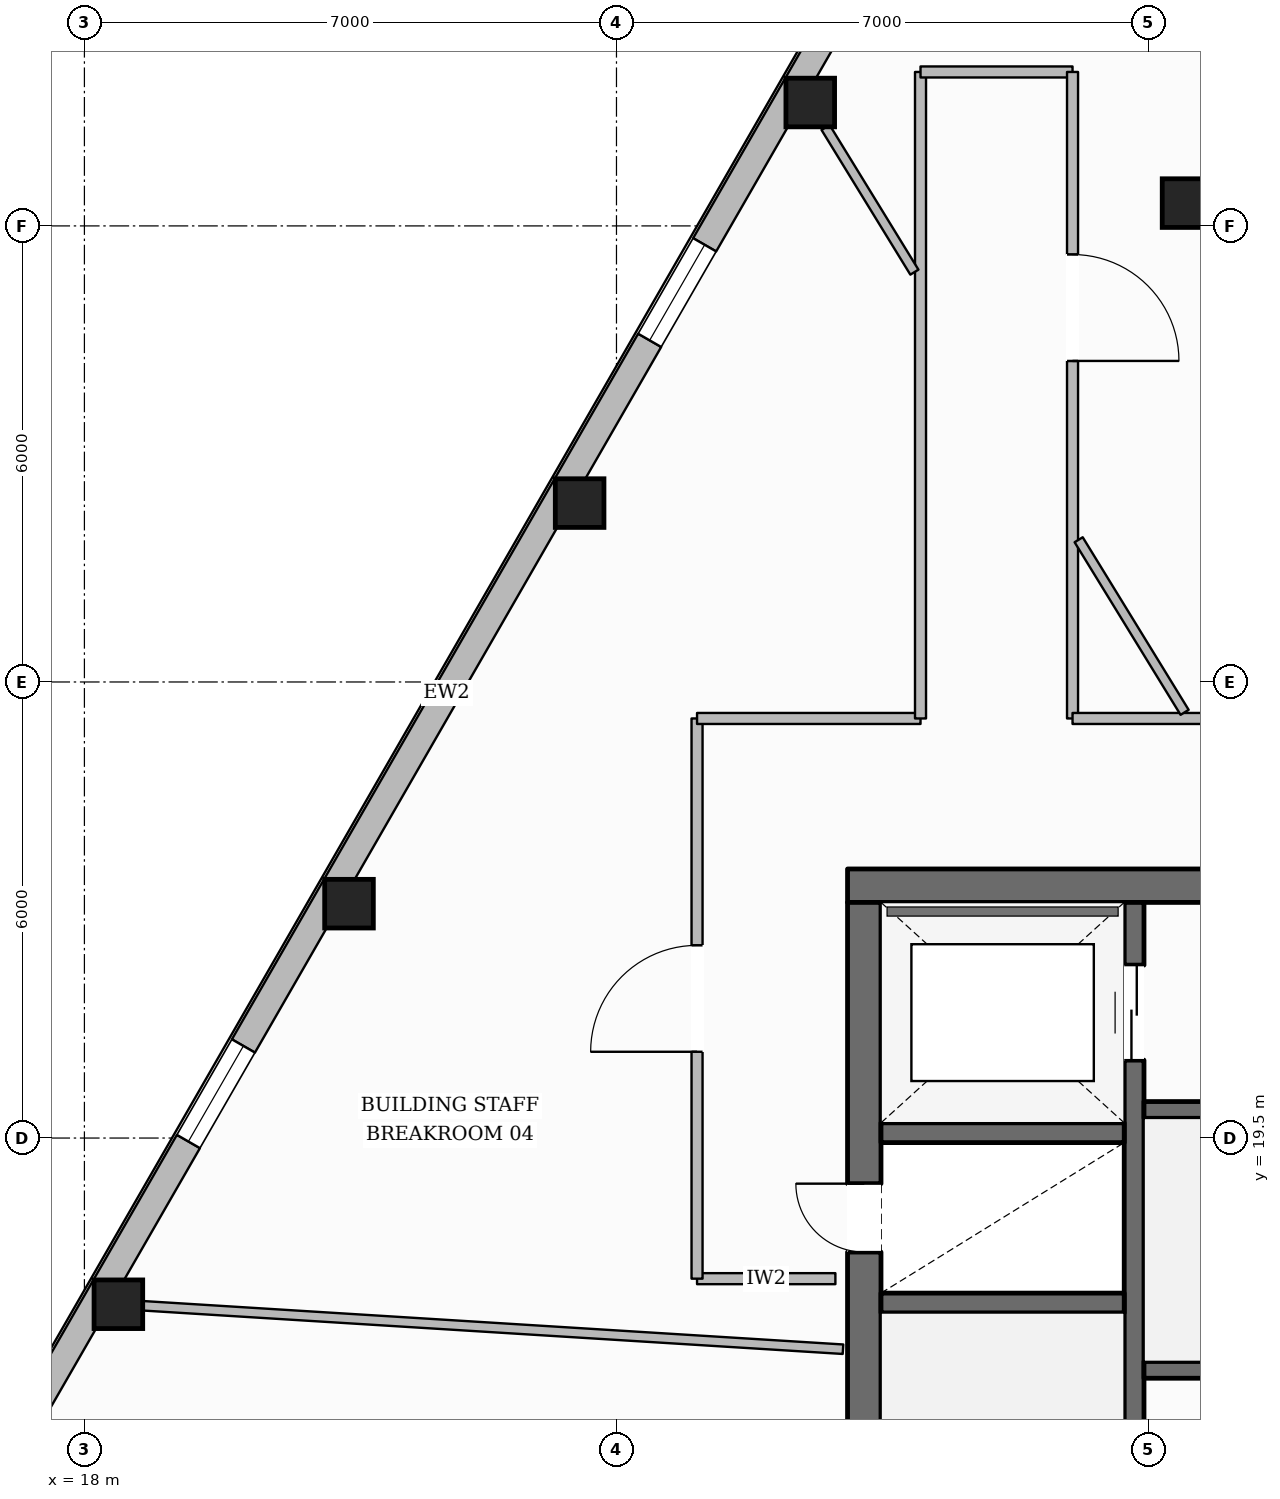
"""IFC4 building model, lengths in metres.
Left out: names, types, materials, properties, quantities, classifications, styles, units other than length and angle.
Written with IfcOpenShell. Run it as: python <this file> out.ifc"""

import sys

from ifc_helpers import new_model, si_unit, direction, frame, frame_2d, origin, origin_2d, place, context, subcontext, project, spatial, rectangle, hollow_rectangle, extrude, element, fill, save


model = new_model("IFC4")
c1 = context("Model", 3, precision=1e-05, world=origin(), true_north=direction((0.0, 1.0)))
c2 = subcontext(c1, "Body", "Model", "MODEL_VIEW")
j1 = project(units=[si_unit("LENGTHUNIT", "METRE"), si_unit("PLANEANGLEUNIT", "RADIAN")], contexts=[c1])
p1 = place(None, origin())
s1 = spatial("IfcSite", under=j1, at=p1, CompositionType="ELEMENT")
p2 = place(p1, origin())
s2 = spatial("IfcBuilding", under=s1, at=p2, CompositionType="ELEMENT")
p3 = place(p2, frame((0.0, 0.0, 191.95)))
s3 = spatial("IfcBuildingStorey", under=s2, at=p3, CompositionType="ELEMENT", Elevation=191.95)
p4 = place(p3, frame((28.04, 22.82, 0.0), z_axis=(0.0, 0.0, 1.0), x_axis=(1.0, 0.0, 0.0)))
e1 = element("IfcWall", 1, at=p4, inside=s3, PredefinedType="SOLIDWALL", context=c2, shape_type="SweptSolid", body=[
    extrude(rectangle(XDim=19.92, YDim=0.44, at=frame_2d((9.96, 0.0))), origin(), (0.0, 0.0, 1.0), 3.6),
])
p5 = place(p4, frame((6.235, 0.0, 0.0)))
e2 = element("IfcOpeningElement", 2, at=p5, cuts=e1, PredefinedType="OPENING", context=c2, shape_type="SweptSolid", body=[
    extrude(rectangle(XDim=1.05, YDim=2.15, at=frame_2d((0.525, 1.075))), frame((0.0, 0.23, 0.0), z_axis=(0.0, -1.0, 0.0), x_axis=(1.0, 0.0, 0.0)), (0.0, 0.0, 1.0), 0.46),
])
p6 = place(p4, frame((12.635, 0.0, 0.0)))
e3 = element("IfcOpeningElement", 3, at=p6, cuts=e1, PredefinedType="OPENING", context=c2, shape_type="SweptSolid", body=[
    extrude(rectangle(XDim=1.05, YDim=2.15, at=frame_2d((0.525, 1.075))), frame((0.0, 0.23, 0.0), z_axis=(0.0, -1.0, 0.0), x_axis=(1.0, 0.0, 0.0)), (0.0, 0.0, 1.0), 0.46),
])
p7 = place(p3, frame((28.26, 9.6, 0.0), z_axis=(0.0, 0.0, 1.0), x_axis=(0.0, 1.0, 0.0)))
e4 = element("IfcWall", 4, at=p7, inside=s3, PredefinedType="SOLIDWALL", context=c2, shape_type="SweptSolid", body=[
    extrude(rectangle(XDim=13.0, YDim=0.44, at=frame_2d((6.5, 0.0))), origin(), (0.0, 0.0, 1.0), 3.6),
])
p8 = place(p7, frame((0.2, 0.0, 0.0)))
e5 = element("IfcOpeningElement", 5, at=p8, cuts=e4, PredefinedType="OPENING", context=c2, shape_type="SweptSolid", body=[
    extrude(rectangle(XDim=1.1, YDim=2.15, at=frame_2d((0.55, 1.075))), frame((0.0, 0.23, 0.0), z_axis=(0.0, -1.0, 0.0), x_axis=(1.0, 0.0, 0.0)), (0.0, 0.0, 1.0), 0.46),
])
p9 = place(p7, frame((8.4, 0.0, 0.0)))
e6 = element("IfcOpeningElement", 6, at=p9, cuts=e4, PredefinedType="OPENING", context=c2, shape_type="SweptSolid", body=[
    extrude(rectangle(XDim=0.9, YDim=2.1, at=frame_2d((0.45, 1.05))), frame((0.0, 0.23, 0.0), z_axis=(0.0, -1.0, 0.0), x_axis=(1.0, 0.0, 0.0)), (0.0, 0.0, 1.0), 0.46),
])
p10 = place(p3, frame((31.81, 9.6, 0.0), z_axis=(0.0, 0.0, 1.0), x_axis=(0.0, 1.0, 0.0)))
e7 = element("IfcWall", 7, at=p10, inside=s3, PredefinedType="SHEAR", context=c2, shape_type="SweptSolid", body=[
    extrude(rectangle(XDim=13.0, YDim=0.26, at=frame_2d((6.5, 0.0))), origin(), (0.0, 0.0, 1.0), 3.6),
])
p11 = place(p10, frame((10.925, 0.0, 0.0)))
e8 = element("IfcOpeningElement", 8, at=p11, cuts=e7, PredefinedType="OPENING", context=c2, shape_type="SweptSolid", body=[
    extrude(rectangle(XDim=1.25, YDim=2.25, at=frame_2d((0.625, 1.125))), frame((0.0, 0.14, 0.0), z_axis=(0.0, -1.0, 0.0), x_axis=(1.0, 0.0, 0.0)), (0.0, 0.0, 1.0), 0.28),
])
for number, where, z_axis, x_axis in (
    (9, (28.48, 17.33, 0.0), (0.0, 0.0, 1.0), (1.0, 0.0, 0.0)),
    (10, (28.48, 19.57, 0.0), (0.0, 0.0, 1.0), (1.0, 0.0, 0.0)),
):
    element("IfcWall", number, at=place(p3, frame(where, z_axis=z_axis, x_axis=x_axis)), inside=s3, PredefinedType="SHEAR", context=c2, shape_type="SweptSolid", body=[
        extrude(rectangle(XDim=3.2, YDim=0.26, at=frame_2d((1.6, 0.0))), origin(), (0.0, 0.0, 1.0), 3.6),
    ])
p12 = place(p3, frame((31.94, 19.87, 0.0), z_axis=(0.0, 0.0, 1.0), x_axis=(1.0, 0.0, 0.0)))
e11 = element("IfcWall", 11, at=p12, inside=s3, PredefinedType="SOLIDWALL", context=c2, shape_type="SweptSolid", body=[
    extrude(rectangle(XDim=12.12, YDim=0.22, at=frame_2d((6.06, 0.0))), origin(), (0.0, 0.0, 1.0), 3.6),
])
p13 = place(p12, frame((6.3, 0.0, 0.0)))
e12 = element("IfcOpeningElement", 12, at=p13, cuts=e11, PredefinedType="OPENING", context=c2, shape_type="SweptSolid", body=[
    extrude(rectangle(XDim=1.1, YDim=2.15, at=frame_2d((0.55, 1.075))), frame((0.0, 0.12, 0.0), z_axis=(0.0, -1.0, 0.0), x_axis=(1.0, 0.0, 0.0)), (0.0, 0.0, 1.0), 0.24),
])
p14 = place(p12, frame((9.51, 0.0, 0.0)))
e13 = element("IfcOpeningElement", 13, at=p14, cuts=e11, PredefinedType="OPENING", context=c2, shape_type="SweptSolid", body=[
    extrude(rectangle(XDim=0.9, YDim=2.1, at=frame_2d((0.45, 1.05))), frame((0.0, 0.12, 0.0), z_axis=(0.0, -1.0, 0.0), x_axis=(1.0, 0.0, 0.0)), (0.0, 0.0, 1.0), 0.24),
])
p15 = place(p3, frame((31.94, 16.45, 0.0), z_axis=(0.0, 0.0, 1.0), x_axis=(1.0, 0.0, 0.0)))
e14 = element("IfcWall", 14, at=p15, inside=s3, PredefinedType="SOLIDWALL", context=c2, shape_type="SweptSolid", body=[
    extrude(rectangle(XDim=12.12, YDim=0.22, at=frame_2d((6.06, 0.0))), origin(), (0.0, 0.0, 1.0), 3.6),
])
for number, where, z_axis, x_axis in (
    (15, (27.549, 33.123, 0.0), (0.0, 0.0, 1.0), (1.0, 0.0, 0.0)),
    (16, (24.515, 27.854, 0.0), (0.0, 0.0, 1.0), (1.0, 0.0, 0.0)),
    (17, (21.481, 22.583, 0.0), (0.0, 0.0, 1.0), (1.0, 0.0, 0.0)),
    (18, (18.447, 17.313, 0.0), (0.0, 0.0, 1.0), (1.0, 0.0, 0.0)),
    (19, (32.5, 31.8, 0.0), (0.0, 0.0, 1.0), (1.0, 0.0, 0.0)),
):
    element("IfcColumn", number, at=place(p3, frame(where, z_axis=z_axis, x_axis=x_axis)), inside=s3, PredefinedType="COLUMN", context=c2, shape_type="SweptSolid", body=[
        extrude(hollow_rectangle(XDim=0.64, YDim=0.64, WallThickness=0.028, at=origin_2d()), origin(), (0.0, 0.0, 1.0), 3.6),
    ])
p16 = place(p3, frame((14.94, 11.763, 0.0), z_axis=(0.0, 0.0, 1.0), x_axis=(0.498943522518, 0.866634502739, 0.0)))
e20 = element("IfcWall", 20, at=p16, inside=s3, PredefinedType="STANDARD", context=c2, shape_type="SweptSolid", body=[
    extrude(rectangle(XDim=37.445, YDim=0.35, at=frame_2d((18.723, 0.0))), origin(), (0.0, 0.0, 1.0), 3.132),
])
p17 = place(p16, frame((27.484, 0.0, 0.0)))
e21 = element("IfcOpeningElement", 21, at=p17, cuts=e20, PredefinedType="OPENING", context=c2, shape_type="SweptSolid", body=[
    extrude(rectangle(XDim=1.0, YDim=2.2, at=frame_2d((0.5, 1.1))), frame((0.0, 0.185, 0.0), z_axis=(0.0, -1.0, 0.0), x_axis=(1.0, 0.0, 0.0)), (0.0, 0.0, 1.0), 0.37),
])
p18 = place(p16, frame((33.2, 0.0, 0.65)))
e22 = element("IfcOpeningElement", 22, at=p18, cuts=e20, PredefinedType="OPENING", context=c2, shape_type="SweptSolid", body=[
    extrude(rectangle(XDim=1.45, YDim=1.75, at=frame_2d((0.725, 0.875))), frame((0.0, 0.185, 0.0), z_axis=(0.0, -1.0, 0.0), x_axis=(1.0, 0.0, 0.0)), (0.0, 0.0, 1.0), 0.37),
])
p19 = place(p16, frame((21.038, 0.0, 0.65)))
e23 = element("IfcOpeningElement", 23, at=p19, cuts=e20, PredefinedType="OPENING", context=c2, shape_type="SweptSolid", body=[
    extrude(rectangle(XDim=1.45, YDim=1.75, at=frame_2d((0.725, 0.875))), frame((0.0, 0.185, 0.0), z_axis=(0.0, -1.0, 0.0), x_axis=(1.0, 0.0, 0.0)), (0.0, 0.0, 1.0), 0.37),
])
p20 = place(p16, frame((8.875, 0.0, 0.65)))
e24 = element("IfcOpeningElement", 24, at=p20, cuts=e20, PredefinedType="OPENING", context=c2, shape_type="SweptSolid", body=[
    extrude(rectangle(XDim=1.45, YDim=1.75, at=frame_2d((0.725, 0.875))), frame((0.0, 0.185, 0.0), z_axis=(0.0, -1.0, 0.0), x_axis=(1.0, 0.0, 0.0)), (0.0, 0.0, 1.0), 0.37),
])
p21 = place(p16, frame((2.795, 0.0, 0.65)))
e25 = element("IfcOpeningElement", 25, at=p21, cuts=e20, PredefinedType="OPENING", context=c2, shape_type="SweptSolid", body=[
    extrude(rectangle(XDim=1.45, YDim=1.75, at=frame_2d((0.725, 0.875))), frame((0.0, 0.185, 0.0), z_axis=(0.0, -1.0, 0.0), x_axis=(1.0, 0.0, 0.0)), (0.0, 0.0, 1.0), 0.37),
])
p22 = place(p3, frame((27.88, 17.65, 0.0), z_axis=(0.0, 0.0, 1.0), x_axis=(-1.0, 0.0, 0.0)))
e26 = element("IfcWall", 26, at=p22, inside=s3, PredefinedType="PARTITIONING", context=c2, shape_type="SweptSolid", body=[
    extrude(rectangle(XDim=1.82, YDim=0.145, at=frame_2d((0.91, 0.0))), origin(), (0.0, 0.0, 1.0), 3.6),
])
p23 = place(p3, frame((26.06, 17.65, 0.0), z_axis=(0.0, 0.0, 1.0), x_axis=(0.0, 1.0, 0.0)))
e27 = element("IfcWall", 27, at=p23, inside=s3, PredefinedType="PARTITIONING", context=c2, shape_type="SweptSolid", body=[
    extrude(rectangle(XDim=7.37, YDim=0.145, at=frame_2d((3.685, 0.0))), origin(), (0.0, 0.0, 1.0), 3.339),
])
p24 = place(p23, frame((2.985, 0.0, 0.0)))
e28 = element("IfcOpeningElement", 28, at=p24, cuts=e27, PredefinedType="OPENING", context=c2, shape_type="SweptSolid", body=[
    extrude(rectangle(XDim=1.4, YDim=2.2, at=frame_2d((0.7, 1.1))), frame((0.0, 0.083, 0.0), z_axis=(0.0, -1.0, 0.0), x_axis=(1.0, 0.0, 0.0)), (0.0, 0.0, 1.0), 0.165),
])
p25 = place(p3, frame((26.06, 25.02, 0.0), z_axis=(0.0, 0.0, 1.0), x_axis=(1.0, 0.0, 0.0)))
e29 = element("IfcWall", 29, at=p25, inside=s3, PredefinedType="PARTITIONING", context=c2, shape_type="SweptSolid", body=[
    extrude(rectangle(XDim=2.94, YDim=0.145, at=frame_2d((1.47, 0.0))), origin(), (0.0, 0.0, 1.0), 3.6),
])
p26 = place(p3, frame((29.0, 25.02, 0.0), z_axis=(0.0, 0.0, 1.0), x_axis=(0.0, 1.0, 0.0)))
e30 = element("IfcWall", 30, at=p26, inside=s3, PredefinedType="PARTITIONING", context=c2, shape_type="SweptSolid", body=[
    extrude(rectangle(XDim=8.505, YDim=0.145, at=frame_2d((4.253, 0.0))), origin(), (0.0, 0.0, 1.0), 3.6),
])
p27 = place(p3, frame((29.0, 33.525, 0.0), z_axis=(0.0, 0.0, 1.0), x_axis=(1.0, 0.0, 0.0)))
e31 = element("IfcWall", 31, at=p27, inside=s3, PredefinedType="PARTITIONING", context=c2, shape_type="SweptSolid", body=[
    extrude(rectangle(XDim=2.0, YDim=0.145, at=frame_2d((1.0, 0.0))), origin(), (0.0, 0.0, 1.0), 3.6),
])
p28 = place(p3, frame((31.0, 33.525, 0.0), z_axis=(0.0, 0.0, 1.0), x_axis=(0.0, -1.0, 0.0)))
e32 = element("IfcWall", 32, at=p28, inside=s3, PredefinedType="PARTITIONING", context=c2, shape_type="SweptSolid", body=[
    extrude(rectangle(XDim=8.505, YDim=0.145, at=frame_2d((4.253, 0.0))), origin(), (0.0, 0.0, 1.0), 3.6),
])
p29 = place(p28, frame((2.402, 0.0, 0.0)))
e33 = element("IfcOpeningElement", 33, at=p29, cuts=e32, PredefinedType="OPENING", context=c2, shape_type="SweptSolid", body=[
    extrude(rectangle(XDim=1.4, YDim=2.2, at=frame_2d((0.7, 1.1))), frame((0.0, 0.083, 0.0), z_axis=(0.0, -1.0, 0.0), x_axis=(1.0, 0.0, 0.0)), (0.0, 0.0, 1.0), 0.165),
])
p30 = place(p3, frame((31.0, 25.02, 0.0), z_axis=(0.0, 0.0, 1.0), x_axis=(1.0, 0.0, 0.0)))
e34 = element("IfcWall", 34, at=p30, inside=s3, PredefinedType="PARTITIONING", context=c2, shape_type="SweptSolid", body=[
    extrude(rectangle(XDim=14.0, YDim=0.145, at=frame_2d((7.0, 0.0))), origin(), (0.0, 0.0, 1.0), 3.6),
])
p31 = place(p30, frame((3.56, 0.0, 0.0)))
e35 = element("IfcOpeningElement", 35, at=p31, cuts=e34, PredefinedType="OPENING", context=c2, shape_type="SweptSolid", body=[
    extrude(rectangle(XDim=0.88, YDim=2.1, at=frame_2d((0.44, 1.05))), frame((0.0, 0.083, 0.0), z_axis=(0.0, -1.0, 0.0), x_axis=(1.0, 0.0, 0.0)), (0.0, 0.0, 1.0), 0.165),
])
p32 = place(p30, frame((6.08, 0.0, 0.0)))
e36 = element("IfcOpeningElement", 36, at=p32, cuts=e34, PredefinedType="OPENING", context=c2, shape_type="SweptSolid", body=[
    extrude(rectangle(XDim=0.88, YDim=2.1, at=frame_2d((0.44, 1.05))), frame((0.0, 0.083, 0.0), z_axis=(0.0, -1.0, 0.0), x_axis=(1.0, 0.0, 0.0)), (0.0, 0.0, 1.0), 0.165),
])
p33 = place(p30, frame((8.46, 0.0, 0.0)))
e37 = element("IfcOpeningElement", 37, at=p33, cuts=e34, PredefinedType="OPENING", context=c2, shape_type="SweptSolid", body=[
    extrude(rectangle(XDim=0.96, YDim=2.1, at=frame_2d((0.48, 1.05))), frame((0.0, 0.083, 0.0), z_axis=(0.0, -1.0, 0.0), x_axis=(1.0, 0.0, 0.0)), (0.0, 0.0, 1.0), 0.165),
])
p34 = place(p3, frame((32.475, 25.101, 0.0), z_axis=(0.0, 0.0, 1.0), x_axis=(-0.52318715373, 0.852217813808, 0.0)))
e38 = element("IfcWall", 38, at=p34, inside=s3, PredefinedType="PARTITIONING", context=c2, shape_type="SweptSolid", body=[
    extrude(rectangle(XDim=2.665, YDim=0.125, at=frame_2d((1.332, 0.0))), origin(), (0.0, 0.0, 1.0), 3.6),
])
p35 = place(p3, frame((28.919, 30.892, 0.0), z_axis=(0.0, 0.0, 1.0), x_axis=(-0.523164171822, 0.852231922262, 0.0)))
e39 = element("IfcWall", 39, at=p35, inside=s3, PredefinedType="PARTITIONING", context=c2, shape_type="SweptSolid", body=[
    extrude(rectangle(XDim=2.234, YDim=0.125, at=frame_2d((1.117, 0.0))), origin(), (0.0, 0.0, 1.0), 3.6),
])
p36 = place(p3, frame((27.98, 16.722, 0.0), z_axis=(0.0, 0.0, 1.0), x_axis=(-0.998078039193, 0.061969570596, 0.0)))
e40 = element("IfcWall", 40, at=p36, inside=s3, PredefinedType="PARTITIONING", context=c2, shape_type="SweptSolid", body=[
    extrude(rectangle(XDim=9.223, YDim=0.125, at=frame_2d((4.611, 0.0))), origin(), (0.0, 0.0, 1.0), 3.141),
])
p37 = place(p19, origin())
e41 = element("IfcWindow", 41, at=p37, inside=s3, PartitioningType="SINGLE_PANEL", PredefinedType="WINDOW", context=c2, shape_type="SweptSolid", body=[
    extrude(rectangle(XDim=1.45, YDim=1.75, at=frame_2d((0.725, 0.875))), frame((0.0, 0.03, 0.0), z_axis=(0.0, -1.0, 0.0), x_axis=(1.0, 0.0, 0.0)), (0.0, 0.0, 1.0), 0.06),
])
fill(e23, e41)
p38 = place(p20, origin())
e42 = element("IfcWindow", 42, at=p38, inside=s3, PartitioningType="SINGLE_PANEL", PredefinedType="WINDOW", context=c2, shape_type="SweptSolid", body=[
    extrude(rectangle(XDim=1.45, YDim=1.75, at=frame_2d((0.725, 0.875))), frame((0.0, 0.03, 0.0), z_axis=(0.0, -1.0, 0.0), x_axis=(1.0, 0.0, 0.0)), (0.0, 0.0, 1.0), 0.06),
])
fill(e24, e42)
p39 = place(p9, origin())
e43 = element("IfcDoor", 43, at=p39, inside=s3, OperationType="SINGLE_SWING_RIGHT", PredefinedType="DOOR", context=c2, shape_type="SweptSolid", body=[
    extrude(rectangle(XDim=0.9, YDim=2.1, at=frame_2d((0.45, 1.05))), frame((0.0, 0.025, 0.0), z_axis=(0.0, -1.0, 0.0), x_axis=(1.0, 0.0, 0.0)), (0.0, 0.0, 1.0), 0.05),
])
fill(e6, e43)
p40 = place(p11, origin())
e44 = element("IfcDoor", 44, at=p40, inside=s3, OperationType="DOUBLE_DOOR_SLIDING", PredefinedType="DOOR", context=c2, shape_type="SweptSolid", body=[
    extrude(rectangle(XDim=1.25, YDim=2.25, at=frame_2d((0.625, 1.125))), frame((0.0, 0.025, 0.0), z_axis=(0.0, -1.0, 0.0), x_axis=(1.0, 0.0, 0.0)), (0.0, 0.0, 1.0), 0.05),
])
fill(e8, e44)
p41 = place(p29, origin())
e45 = element("IfcDoor", 45, at=p41, inside=s3, OperationType="SINGLE_SWING_RIGHT", PredefinedType="DOOR", context=c2, shape_type="SweptSolid", body=[
    extrude(rectangle(XDim=1.4, YDim=2.2, at=frame_2d((0.7, 1.1))), frame((0.0, 0.025, 0.0), z_axis=(0.0, -1.0, 0.0), x_axis=(1.0, 0.0, 0.0)), (0.0, 0.0, 1.0), 0.05),
])
fill(e33, e45)
p42 = place(p24, origin())
e46 = element("IfcDoor", 46, at=p42, inside=s3, OperationType="SINGLE_SWING_LEFT", PredefinedType="DOOR", context=c2, shape_type="SweptSolid", body=[
    extrude(rectangle(XDim=1.4, YDim=2.2, at=frame_2d((0.7, 1.1))), frame((0.0, 0.025, 0.0), z_axis=(0.0, -1.0, 0.0), x_axis=(1.0, 0.0, 0.0)), (0.0, 0.0, 1.0), 0.05),
])
fill(e28, e46)
save(model, sys.argv[1])
